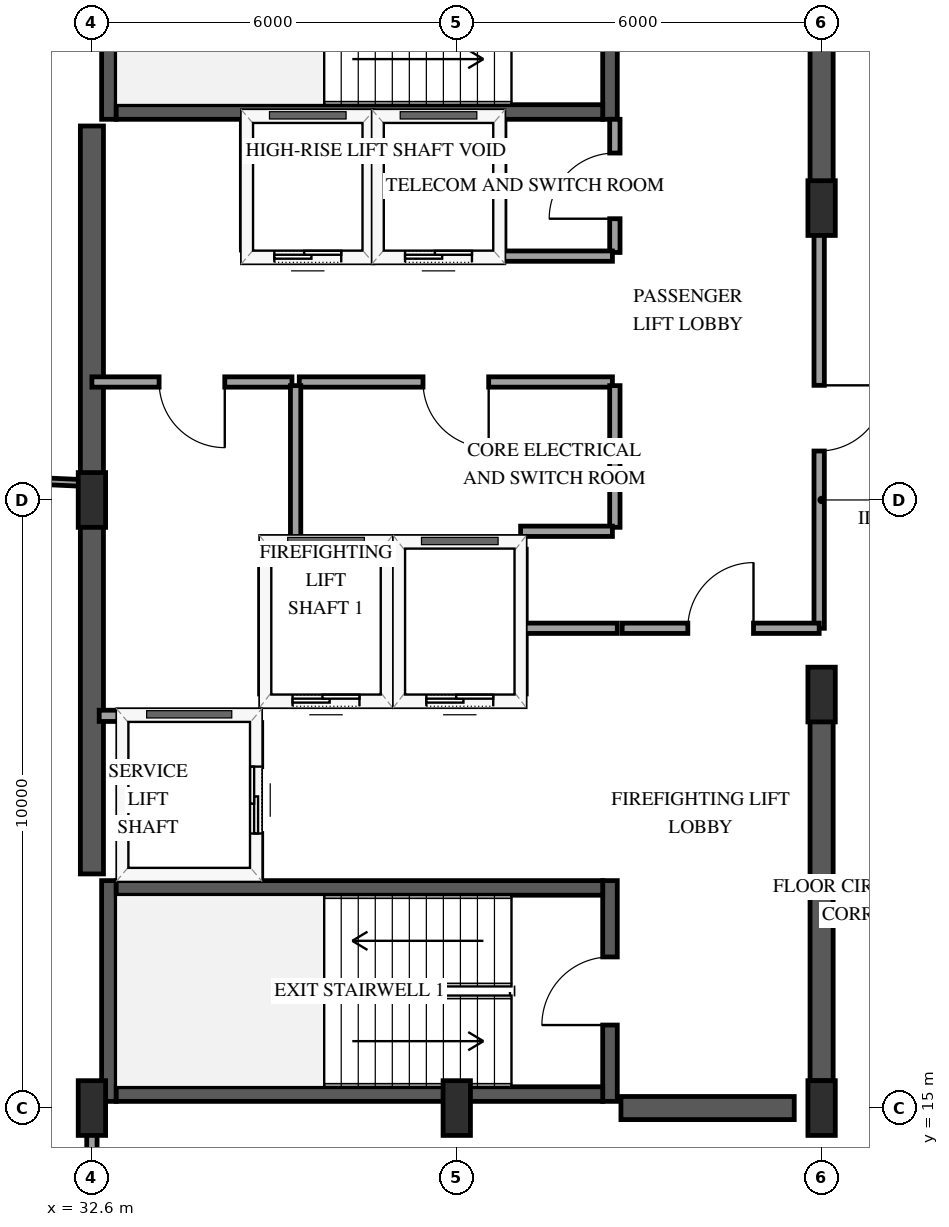
"""IFC4 building model, lengths in metres.
Left out: names, types, materials, properties, quantities, classifications, styles, units other than length and angle.
Written with IfcOpenShell. Run it as: python <this file> out.ifc"""

import sys

from ifc_helpers import new_model, si_unit, direction, frame, frame_2d, origin, origin_2d, place, context, subcontext, project, spatial, rectangle, extrude, element, fill, save


model = new_model("IFC4")
c1 = context("Model", 3, precision=1e-05, world=origin(), true_north=direction((0.0, 1.0)))
c2 = subcontext(c1, "Body", "Model", "MODEL_VIEW")
j1 = project(units=[si_unit("LENGTHUNIT", "METRE"), si_unit("PLANEANGLEUNIT", "RADIAN")], contexts=[c1])
p1 = place(None, origin())
s1 = spatial("IfcSite", under=j1, at=p1, CompositionType="ELEMENT")
p2 = place(p1, origin())
s2 = spatial("IfcBuilding", under=s1, at=p2, CompositionType="ELEMENT")
p3 = place(p2, frame((0.0, 0.0, 297.25)))
s3 = spatial("IfcBuildingStorey", under=s2, at=p3, CompositionType="ELEMENT", Elevation=297.25)
p4 = place(p3, frame((32.88, 15.11, 0.0), z_axis=(0.0, 0.0, 1.0), x_axis=(0.0, 1.0, 0.0)))
e1 = element("IfcWall", 1, at=p4, inside=s3, PredefinedType="SHEAR", context=c2, shape_type="SweptSolid", body=[
    extrude(rectangle(XDim=3.63, YDim=0.24, at=frame_2d((1.815, 0.0))), origin(), (0.0, 0.0, 1.0), 4.2),
])
p5 = place(p3, frame((41.12, 15.11, 0.0), z_axis=(0.0, 0.0, 1.0), x_axis=(0.0, 1.0, 0.0)))
e2 = element("IfcWall", 2, at=p5, inside=s3, PredefinedType="SHEAR", context=c2, shape_type="SweptSolid", body=[
    extrude(rectangle(XDim=3.63, YDim=0.24, at=frame_2d((1.815, 0.0))), origin(), (0.0, 0.0, 1.0), 4.2),
])
p6 = place(p5, frame((1.255, 0.0, 0.0)))
e3 = element("IfcOpeningElement", 3, at=p6, cuts=e2, PredefinedType="OPENING", context=c2, shape_type="SweptSolid", body=[
    extrude(rectangle(XDim=1.12, YDim=2.15, at=frame_2d((0.56, 1.075))), frame((0.0, 0.13, 0.0), z_axis=(0.0, -1.0, 0.0), x_axis=(1.0, 0.0, 0.0)), (0.0, 0.0, 1.0), 0.26),
])
for number, where, z_axis, x_axis in (
    (4, (33.0, 15.23, 0.0), (0.0, 0.0, 1.0), (1.0, 0.0, 0.0)),
    (5, (33.0, 18.62, 0.0), (0.0, 0.0, 1.0), (1.0, 0.0, 0.0)),
):
    element("IfcWall", number, at=place(p3, frame(where, z_axis=z_axis, x_axis=x_axis)), inside=s3, PredefinedType="SHEAR", context=c2, shape_type="SweptSolid", body=[
        extrude(rectangle(XDim=8.0, YDim=0.24, at=frame_2d((4.0, 0.0))), origin(), (0.0, 0.0, 1.0), 4.2),
    ])
p7 = place(p3, frame((32.88, 31.26, 0.0), z_axis=(0.0, 0.0, 1.0), x_axis=(0.0, 1.0, 0.0)))
e6 = element("IfcWall", 6, at=p7, inside=s3, PredefinedType="SHEAR", context=c2, shape_type="SweptSolid", body=[
    extrude(rectangle(XDim=3.63, YDim=0.24, at=frame_2d((1.815, 0.0))), origin(), (0.0, 0.0, 1.0), 4.2),
])
p8 = place(p3, frame((41.12, 31.26, 0.0), z_axis=(0.0, 0.0, 1.0), x_axis=(0.0, 1.0, 0.0)))
e7 = element("IfcWall", 7, at=p8, inside=s3, PredefinedType="SHEAR", context=c2, shape_type="SweptSolid", body=[
    extrude(rectangle(XDim=3.63, YDim=0.24, at=frame_2d((1.815, 0.0))), origin(), (0.0, 0.0, 1.0), 4.2),
])
p9 = place(p8, frame((1.255, 0.0, 0.0)))
e8 = element("IfcOpeningElement", 8, at=p9, cuts=e7, PredefinedType="OPENING", context=c2, shape_type="SweptSolid", body=[
    extrude(rectangle(XDim=1.12, YDim=2.15, at=frame_2d((0.56, 1.075))), frame((0.0, 0.13, 0.0), z_axis=(0.0, -1.0, 0.0), x_axis=(1.0, 0.0, 0.0)), (0.0, 0.0, 1.0), 0.26),
])
p10 = place(p3, frame((33.0, 31.38, 0.0), z_axis=(0.0, 0.0, 1.0), x_axis=(1.0, 0.0, 0.0)))
e9 = element("IfcWall", 9, at=p10, inside=s3, PredefinedType="SHEAR", context=c2, shape_type="SweptSolid", body=[
    extrude(rectangle(XDim=8.0, YDim=0.24, at=frame_2d((4.0, 0.0))), origin(), (0.0, 0.0, 1.0), 4.2),
])
p11 = place(p3, frame((32.6, 18.85, 0.0), z_axis=(0.0, 0.0, 1.0), x_axis=(0.0, 1.0, 0.0)))
e10 = element("IfcWall", 10, at=p11, inside=s3, PredefinedType="SHEAR", context=c2, shape_type="SweptSolid", body=[
    extrude(rectangle(XDim=12.3, YDim=0.38, at=frame_2d((6.15, 0.0))), origin(), (0.0, 0.0, 1.0), 4.2),
])
p12 = place(p3, frame((41.3, 15.0, 0.0), z_axis=(0.0, 0.0, 1.0), x_axis=(1.0, 0.0, 0.0)))
e11 = element("IfcWall", 11, at=p12, inside=s3, PredefinedType="SHEAR", context=c2, shape_type="SweptSolid", body=[
    extrude(rectangle(XDim=2.85, YDim=0.38, at=frame_2d((1.425, 0.0))), origin(), (0.0, 0.0, 1.0), 4.2),
])
p13 = place(p3, frame((44.6, 15.45, 0.0), z_axis=(0.0, 0.0, 1.0), x_axis=(0.0, 1.0, 0.0)))
e12 = element("IfcWall", 12, at=p13, inside=s3, PredefinedType="SHEAR", context=c2, shape_type="SweptSolid", body=[
    extrude(rectangle(XDim=6.35, YDim=0.38, at=frame_2d((3.175, 0.0))), origin(), (0.0, 0.0, 1.0), 4.2),
])
p14 = place(p3, frame((44.6, 29.8, 0.0), z_axis=(0.0, 0.0, 1.0), x_axis=(0.0, 1.0, 0.0)))
e13 = element("IfcWall", 13, at=p14, inside=s3, PredefinedType="SHEAR", context=c2, shape_type="SweptSolid", body=[
    extrude(rectangle(XDim=4.75, YDim=0.38, at=frame_2d((2.375, 0.0))), origin(), (0.0, 0.0, 1.0), 4.2),
])
for number, where, z_axis, x_axis in (
    (14, (32.6, 15.0, 0.0), (0.0, 0.0, 1.0), (1.0, 0.0, 0.0)),
    (15, (32.6, 25.0, 0.0), (0.0, 0.0, 1.0), (1.0, 0.0, 0.0)),
    (16, (38.6, 15.0, 0.0), (0.0, 0.0, 1.0), (1.0, 0.0, 0.0)),
    (17, (44.6, 15.0, 0.0), (0.0, 0.0, 1.0), (1.0, 0.0, 0.0)),
    (18, (44.6, 21.8, 0.0), (0.0, 0.0, 1.0), (1.0, 0.0, 0.0)),
    (19, (44.6, 29.8, 0.0), (0.0, 0.0, 1.0), (1.0, 0.0, 0.0)),
):
    element("IfcColumn", number, at=place(p3, frame(where, z_axis=z_axis, x_axis=x_axis)), inside=s3, PredefinedType="PILASTER", context=c2, shape_type="SweptSolid", body=[
        extrude(rectangle(XDim=0.45, YDim=0.9, at=origin_2d()), origin(), (0.0, 0.0, 1.0), 4.2),
    ])
p15 = place(p3, frame((35.45, 21.7, 0.0), z_axis=(0.0, 0.0, 1.0), x_axis=(1.0, 0.0, 0.0)))
e20 = element("IfcWall", 20, at=p15, inside=s3, PredefinedType="SOLIDWALL", context=c2, shape_type="SweptSolid", body=[
    extrude(rectangle(XDim=2.0, YDim=0.185, at=frame_2d((1.0, 0.0))), origin(), (0.0, 0.0, 1.0), 3.895),
])
p16 = place(p15, frame((0.45, 0.0, 0.0)))
e21 = element("IfcOpeningElement", 21, at=p16, cuts=e20, PredefinedType="OPENING", context=c2, shape_type="SweptSolid", body=[
    extrude(rectangle(XDim=1.1, YDim=2.15, at=frame_2d((0.55, 1.075))), frame((0.0, 0.103, 0.0), z_axis=(0.0, -1.0, 0.0), x_axis=(1.0, 0.0, 0.0)), (0.0, 0.0, 1.0), 0.205),
])
p17 = place(p3, frame((35.45, 24.3, 0.0), z_axis=(0.0, 0.0, 1.0), x_axis=(1.0, 0.0, 0.0)))
e22 = element("IfcWall", 22, at=p17, inside=s3, PredefinedType="SOLIDWALL", context=c2, shape_type="SweptSolid", body=[
    extrude(rectangle(XDim=2.0, YDim=0.185, at=frame_2d((1.0, 0.0))), origin(), (0.0, 0.0, 1.0), 3.895),
])
for number, where, z_axis, x_axis in (
    (23, (35.45, 21.81, 0.0), (0.0, 0.0, 1.0), (0.0, 1.0, 0.0)),
    (24, (37.45, 21.81, 0.0), (0.0, 0.0, 1.0), (0.0, 1.0, 0.0)),
):
    element("IfcWall", number, at=place(p3, frame(where, z_axis=z_axis, x_axis=x_axis)), inside=s3, PredefinedType="SOLIDWALL", context=c2, shape_type="SweptSolid", body=[
        extrude(rectangle(XDim=2.38, YDim=0.185, at=frame_2d((1.19, 0.0))), origin(), (0.0, 0.0, 1.0), 3.895),
    ])
p18 = place(p3, frame((37.65, 21.7, 0.0), z_axis=(0.0, 0.0, 1.0), x_axis=(1.0, 0.0, 0.0)))
e25 = element("IfcWall", 25, at=p18, inside=s3, PredefinedType="SOLIDWALL", context=c2, shape_type="SweptSolid", body=[
    extrude(rectangle(XDim=2.0, YDim=0.185, at=frame_2d((1.0, 0.0))), origin(), (0.0, 0.0, 1.0), 3.895),
])
p19 = place(p18, frame((0.45, 0.0, 0.0)))
e26 = element("IfcOpeningElement", 26, at=p19, cuts=e25, PredefinedType="OPENING", context=c2, shape_type="SweptSolid", body=[
    extrude(rectangle(XDim=1.1, YDim=2.15, at=frame_2d((0.55, 1.075))), frame((0.0, 0.103, 0.0), z_axis=(0.0, -1.0, 0.0), x_axis=(1.0, 0.0, 0.0)), (0.0, 0.0, 1.0), 0.205),
])
p20 = place(p3, frame((37.65, 24.3, 0.0), z_axis=(0.0, 0.0, 1.0), x_axis=(1.0, 0.0, 0.0)))
e27 = element("IfcWall", 27, at=p20, inside=s3, PredefinedType="SOLIDWALL", context=c2, shape_type="SweptSolid", body=[
    extrude(rectangle(XDim=2.0, YDim=0.185, at=frame_2d((1.0, 0.0))), origin(), (0.0, 0.0, 1.0), 3.895),
])
p21 = place(p3, frame((39.65, 21.81, 0.0), z_axis=(0.0, 0.0, 1.0), x_axis=(0.0, 1.0, 0.0)))
e28 = element("IfcWall", 28, at=p21, inside=s3, PredefinedType="SOLIDWALL", context=c2, shape_type="SweptSolid", body=[
    extrude(rectangle(XDim=2.38, YDim=0.185, at=frame_2d((1.19, 0.0))), origin(), (0.0, 0.0, 1.0), 3.895),
])
p22 = place(p3, frame((32.72, 21.45, 0.0), z_axis=(0.0, 0.0, 1.0), x_axis=(1.0, 0.0, 0.0)))
e29 = element("IfcWall", 29, at=p22, inside=s3, PredefinedType="SOLIDWALL", context=c2, shape_type="SweptSolid", body=[
    extrude(rectangle(XDim=2.58, YDim=0.185, at=frame_2d((1.29, 0.0))), origin(), (0.0, 0.0, 1.0), 3.895),
])
p23 = place(p3, frame((35.3, 18.79, 0.0), z_axis=(0.0, 0.0, 1.0), x_axis=(0.0, 1.0, 0.0)))
e30 = element("IfcWall", 30, at=p23, inside=s3, PredefinedType="SOLIDWALL", context=c2, shape_type="SweptSolid", body=[
    extrude(rectangle(XDim=2.55, YDim=0.185, at=frame_2d((1.275, 0.0))), origin(), (0.0, 0.0, 1.0), 3.895),
])
p24 = place(p23, frame((0.725, 0.0, 0.0)))
e31 = element("IfcOpeningElement", 31, at=p24, cuts=e30, PredefinedType="OPENING", context=c2, shape_type="SweptSolid", body=[
    extrude(rectangle(XDim=1.1, YDim=2.15, at=frame_2d((0.55, 1.075))), frame((0.0, 0.103, 0.0), z_axis=(0.0, -1.0, 0.0), x_axis=(1.0, 0.0, 0.0)), (0.0, 0.0, 1.0), 0.205),
])
p25 = place(p3, frame((35.15, 29.0, 0.0), z_axis=(0.0, 0.0, 1.0), x_axis=(1.0, 0.0, 0.0)))
e32 = element("IfcWall", 32, at=p25, inside=s3, PredefinedType="SOLIDWALL", context=c2, shape_type="SweptSolid", body=[
    extrude(rectangle(XDim=2.0, YDim=0.185, at=frame_2d((1.0, 0.0))), origin(), (0.0, 0.0, 1.0), 3.895),
])
p26 = place(p25, frame((0.45, 0.0, 0.0)))
e33 = element("IfcOpeningElement", 33, at=p26, cuts=e32, PredefinedType="OPENING", context=c2, shape_type="SweptSolid", body=[
    extrude(rectangle(XDim=1.1, YDim=2.15, at=frame_2d((0.55, 1.075))), frame((0.0, 0.103, 0.0), z_axis=(0.0, -1.0, 0.0), x_axis=(1.0, 0.0, 0.0)), (0.0, 0.0, 1.0), 0.205),
])
for number, where, z_axis, x_axis in (
    (34, (35.15, 29.11, 0.0), (0.0, 0.0, 1.0), (0.0, 1.0, 0.0)),
    (35, (37.15, 29.11, 0.0), (0.0, 0.0, 1.0), (0.0, 1.0, 0.0)),
):
    element("IfcWall", number, at=place(p3, frame(where, z_axis=z_axis, x_axis=x_axis)), inside=s3, PredefinedType="SOLIDWALL", context=c2, shape_type="SweptSolid", body=[
        extrude(rectangle(XDim=2.1, YDim=0.185, at=frame_2d((1.05, 0.0))), origin(), (0.0, 0.0, 1.0), 3.895),
    ])
p27 = place(p3, frame((37.3, 29.0, 0.0), z_axis=(0.0, 0.0, 1.0), x_axis=(1.0, 0.0, 0.0)))
e36 = element("IfcWall", 36, at=p27, inside=s3, PredefinedType="SOLIDWALL", context=c2, shape_type="SweptSolid", body=[
    extrude(rectangle(XDim=2.0, YDim=0.185, at=frame_2d((1.0, 0.0))), origin(), (0.0, 0.0, 1.0), 3.895),
])
p28 = place(p27, frame((0.45, 0.0, 0.0)))
e37 = element("IfcOpeningElement", 37, at=p28, cuts=e36, PredefinedType="OPENING", context=c2, shape_type="SweptSolid", body=[
    extrude(rectangle(XDim=1.1, YDim=2.15, at=frame_2d((0.55, 1.075))), frame((0.0, 0.103, 0.0), z_axis=(0.0, -1.0, 0.0), x_axis=(1.0, 0.0, 0.0)), (0.0, 0.0, 1.0), 0.205),
])
p29 = place(p3, frame((39.3, 29.11, 0.0), z_axis=(0.0, 0.0, 1.0), x_axis=(0.0, 1.0, 0.0)))
e38 = element("IfcWall", 38, at=p29, inside=s3, PredefinedType="SOLIDWALL", context=c2, shape_type="SweptSolid", body=[
    extrude(rectangle(XDim=2.1, YDim=0.185, at=frame_2d((1.05, 0.0))), origin(), (0.0, 0.0, 1.0), 3.895),
])
p30 = place(p3, frame((32.527, 25.276, 0.0), z_axis=(0.0, 0.0, 1.0), x_axis=(-0.998965188352, 0.045481341909, 0.0)))
e39 = element("IfcWall", 39, at=p30, inside=s3, PredefinedType="PARTITIONING", context=c2, shape_type="SweptSolid", body=[
    extrude(rectangle(XDim=7.215, YDim=0.11, at=frame_2d((3.607, 0.0))), origin(), (0.0, 0.0, 1.0), 3.19),
])
p31 = place(p3, frame((44.56, 29.8, 0.0), z_axis=(0.0, 0.0, 1.0), x_axis=(0.0, -1.0, 0.0)))
e40 = element("IfcWall", 40, at=p31, inside=s3, PredefinedType="PARTITIONING", context=c2, shape_type="SweptSolid", body=[
    extrude(rectangle(XDim=6.91, YDim=0.17, at=frame_2d((3.455, 0.0))), origin(), (0.0, 0.0, 1.0), 2.935),
])
p32 = place(p31, frame((2.915, 0.0, 0.0)))
e41 = element("IfcOpeningElement", 41, at=p32, cuts=e40, PredefinedType="OPENING", context=c2, shape_type="SweptSolid", body=[
    extrude(rectangle(XDim=1.08, YDim=2.15, at=frame_2d((0.54, 1.075))), frame((0.0, 0.095, 0.0), z_axis=(0.0, -1.0, 0.0), x_axis=(1.0, 0.0, 0.0)), (0.0, 0.0, 1.0), 0.19),
])
p33 = place(p3, frame((41.16, 26.94, 0.0), z_axis=(0.0, 0.0, 1.0), x_axis=(-1.0, 0.0, 0.0)))
e42 = element("IfcWall", 42, at=p33, inside=s3, PredefinedType="PARTITIONING", context=c2, shape_type="SweptSolid", body=[
    extrude(rectangle(XDim=5.15, YDim=0.17, at=frame_2d((2.575, 0.0))), origin(), (0.0, 0.0, 1.0), 3.895),
])
p34 = place(p33, frame((2.035, 0.0, 0.0)))
e43 = element("IfcOpeningElement", 43, at=p34, cuts=e42, PredefinedType="OPENING", context=c2, shape_type="SweptSolid", body=[
    extrude(rectangle(XDim=1.08, YDim=2.15, at=frame_2d((0.54, 1.075))), frame((0.0, 0.095, 0.0), z_axis=(0.0, -1.0, 0.0), x_axis=(1.0, 0.0, 0.0)), (0.0, 0.0, 1.0), 0.19),
])
p35 = place(p3, frame((35.89, 26.94, 0.0), z_axis=(0.0, 0.0, 1.0), x_axis=(-1.0, 0.0, 0.0)))
e44 = element("IfcWall", 44, at=p35, inside=s3, PredefinedType="PARTITIONING", context=c2, shape_type="SweptSolid", body=[
    extrude(rectangle(XDim=3.29, YDim=0.17, at=frame_2d((1.645, 0.0))), origin(), (0.0, 0.0, 1.0), 3.895),
])
p36 = place(p35, frame((1.105, 0.0, 0.0)))
e45 = element("IfcOpeningElement", 45, at=p36, cuts=e44, PredefinedType="OPENING", context=c2, shape_type="SweptSolid", body=[
    extrude(rectangle(XDim=1.08, YDim=2.15, at=frame_2d((0.54, 1.075))), frame((0.0, 0.095, 0.0), z_axis=(0.0, -1.0, 0.0), x_axis=(1.0, 0.0, 0.0)), (0.0, 0.0, 1.0), 0.19),
])
p37 = place(p3, frame((41.32, 22.89, 0.0), z_axis=(0.0, 0.0, 1.0), x_axis=(1.0, 0.0, 0.0)))
e46 = element("IfcWall", 46, at=p37, inside=s3, PredefinedType="PARTITIONING", context=c2, shape_type="SweptSolid", body=[
    extrude(rectangle(XDim=3.24, YDim=0.17, at=frame_2d((1.62, 0.0))), origin(), (0.0, 0.0, 1.0), 3.895),
])
p38 = place(p37, frame((1.08, 0.0, 0.0)))
e47 = element("IfcOpeningElement", 47, at=p38, cuts=e46, PredefinedType="OPENING", context=c2, shape_type="SweptSolid", body=[
    extrude(rectangle(XDim=1.08, YDim=2.15, at=frame_2d((0.54, 1.075))), frame((0.0, 0.095, 0.0), z_axis=(0.0, -1.0, 0.0), x_axis=(1.0, 0.0, 0.0)), (0.0, 0.0, 1.0), 0.19),
])
p39 = place(p3, frame((35.95, 26.88, 0.0), z_axis=(0.0, 0.0, 1.0), x_axis=(0.0, -1.0, 0.0)))
e48 = element("IfcWall", 48, at=p39, inside=s3, PredefinedType="PARTITIONING", context=c2, shape_type="SweptSolid", body=[
    extrude(rectangle(XDim=2.58, YDim=0.17, at=frame_2d((1.29, 0.0))), origin(), (0.0, 0.0, 1.0), 3.895),
])
p40 = place(p3, frame((41.2, 24.55, 0.0), z_axis=(0.0, 0.0, 1.0), x_axis=(0.0, 1.0, 0.0)))
e49 = element("IfcWall", 49, at=p40, inside=s3, PredefinedType="PARTITIONING", context=c2, shape_type="SweptSolid", body=[
    extrude(rectangle(XDim=2.33, YDim=0.17, at=frame_2d((1.165, 0.0))), origin(), (0.0, 0.0, 1.0), 3.895),
])
p41 = place(p3, frame((41.2, 29.07, 0.0), z_axis=(0.0, 0.0, 1.0), x_axis=(0.0, 1.0, 0.0)))
e50 = element("IfcWall", 50, at=p41, inside=s3, PredefinedType="PARTITIONING", context=c2, shape_type="SweptSolid", body=[
    extrude(rectangle(XDim=2.19, YDim=0.17, at=frame_2d((1.095, 0.0))), origin(), (0.0, 0.0, 1.0), 3.895),
])
p42 = place(p41, frame((0.555, 0.0, 0.0)))
e51 = element("IfcOpeningElement", 51, at=p42, cuts=e50, PredefinedType="OPENING", context=c2, shape_type="SweptSolid", body=[
    extrude(rectangle(XDim=1.08, YDim=2.15, at=frame_2d((0.54, 1.075))), frame((0.0, 0.095, 0.0), z_axis=(0.0, -1.0, 0.0), x_axis=(1.0, 0.0, 0.0)), (0.0, 0.0, 1.0), 0.19),
])
p43 = place(p3, frame((39.3, 29.01, 0.0), z_axis=(0.0, 0.0, 1.0), x_axis=(1.0, 0.0, 0.0)))
e52 = element("IfcWall", 52, at=p43, inside=s3, PredefinedType="PARTITIONING", context=c2, shape_type="SweptSolid", body=[
    extrude(rectangle(XDim=1.86, YDim=0.17, at=frame_2d((0.93, 0.0))), origin(), (0.0, 0.0, 1.0), 3.895),
])
p44 = place(p3, frame((39.72, 22.89, 0.0), z_axis=(0.0, 0.0, 1.0), x_axis=(1.0, 0.0, 0.0)))
e53 = element("IfcWall", 53, at=p44, inside=s3, PredefinedType="PARTITIONING", context=c2, shape_type="SweptSolid", body=[
    extrude(rectangle(XDim=1.52, YDim=0.17, at=frame_2d((0.76, 0.0))), origin(), (0.0, 0.0, 1.0), 3.895),
])
p45 = place(p3, frame((32.6, 13.37, 0.0), z_axis=(0.0, 0.0, 1.0), x_axis=(0.0, 1.0, 0.0)))
e54 = element("IfcWall", 54, at=p45, inside=s3, PredefinedType="PARTITIONING", context=c2, shape_type="SweptSolid", body=[
    extrude(rectangle(XDim=1.51, YDim=0.17, at=frame_2d((0.755, 0.0))), origin(), (0.0, 0.0, 1.0), 3.895),
])
p46 = place(p3, frame((39.65, 24.485, 0.0), z_axis=(0.0, 0.0, 1.0), x_axis=(1.0, 0.0, 0.0)))
e55 = element("IfcWall", 55, at=p46, inside=s3, PredefinedType="PARTITIONING", context=c2, shape_type="SweptSolid", body=[
    extrude(rectangle(XDim=1.51, YDim=0.17, at=frame_2d((0.755, 0.0))), origin(), (0.0, 0.0, 1.0), 3.895),
])
p47 = place(p16, origin())
e56 = element("IfcDoor", 56, at=p47, inside=s3, OperationType="SLIDING_TO_LEFT", PredefinedType="DOOR", context=c2, shape_type="SweptSolid", body=[
    extrude(rectangle(XDim=1.1, YDim=2.15, at=frame_2d((0.55, 1.075))), frame((0.0, 0.025, 0.0), z_axis=(0.0, -1.0, 0.0), x_axis=(1.0, 0.0, 0.0)), (0.0, 0.0, 1.0), 0.05),
])
fill(e21, e56)
p48 = place(p19, origin())
e57 = element("IfcDoor", 57, at=p48, inside=s3, OperationType="SLIDING_TO_LEFT", PredefinedType="DOOR", context=c2, shape_type="SweptSolid", body=[
    extrude(rectangle(XDim=1.1, YDim=2.15, at=frame_2d((0.55, 1.075))), frame((0.0, 0.025, 0.0), z_axis=(0.0, -1.0, 0.0), x_axis=(1.0, 0.0, 0.0)), (0.0, 0.0, 1.0), 0.05),
])
fill(e26, e57)
p49 = place(p24, origin())
e58 = element("IfcDoor", 58, at=p49, inside=s3, OperationType="SLIDING_TO_LEFT", PredefinedType="DOOR", context=c2, shape_type="SweptSolid", body=[
    extrude(rectangle(XDim=1.1, YDim=2.15, at=frame_2d((0.55, 1.075))), frame((0.0, 0.025, 0.0), z_axis=(0.0, -1.0, 0.0), x_axis=(1.0, 0.0, 0.0)), (0.0, 0.0, 1.0), 0.05),
])
fill(e31, e58)
p50 = place(p26, origin())
e59 = element("IfcDoor", 59, at=p50, inside=s3, OperationType="SLIDING_TO_LEFT", PredefinedType="DOOR", context=c2, shape_type="SweptSolid", body=[
    extrude(rectangle(XDim=1.1, YDim=2.15, at=frame_2d((0.55, 1.075))), frame((0.0, 0.025, 0.0), z_axis=(0.0, -1.0, 0.0), x_axis=(1.0, 0.0, 0.0)), (0.0, 0.0, 1.0), 0.05),
])
fill(e33, e59)
p51 = place(p28, origin())
e60 = element("IfcDoor", 60, at=p51, inside=s3, OperationType="SLIDING_TO_LEFT", PredefinedType="DOOR", context=c2, shape_type="SweptSolid", body=[
    extrude(rectangle(XDim=1.1, YDim=2.15, at=frame_2d((0.55, 1.075))), frame((0.0, 0.025, 0.0), z_axis=(0.0, -1.0, 0.0), x_axis=(1.0, 0.0, 0.0)), (0.0, 0.0, 1.0), 0.05),
])
fill(e37, e60)
p52 = place(p6, origin())
e61 = element("IfcDoor", 61, at=p52, inside=s3, OperationType="SINGLE_SWING_LEFT", PredefinedType="DOOR", context=c2, shape_type="SweptSolid", body=[
    extrude(rectangle(XDim=1.12, YDim=2.15, at=frame_2d((0.56, 1.075))), frame((0.0, 0.025, 0.0), z_axis=(0.0, -1.0, 0.0), x_axis=(1.0, 0.0, 0.0)), (0.0, 0.0, 1.0), 0.05),
])
fill(e3, e61)
p53 = place(p32, origin())
e62 = element("IfcDoor", 62, at=p53, inside=s3, OperationType="SINGLE_SWING_LEFT", PredefinedType="DOOR", context=c2, shape_type="SweptSolid", body=[
    extrude(rectangle(XDim=1.08, YDim=2.15, at=frame_2d((0.54, 1.075))), frame((0.0, 0.025, 0.0), z_axis=(0.0, -1.0, 0.0), x_axis=(1.0, 0.0, 0.0)), (0.0, 0.0, 1.0), 0.05),
])
fill(e41, e62)
p54 = place(p34, origin())
e63 = element("IfcDoor", 63, at=p54, inside=s3, OperationType="SINGLE_SWING_LEFT", PredefinedType="DOOR", context=c2, shape_type="SweptSolid", body=[
    extrude(rectangle(XDim=1.08, YDim=2.15, at=frame_2d((0.54, 1.075))), frame((0.0, 0.025, 0.0), z_axis=(0.0, -1.0, 0.0), x_axis=(1.0, 0.0, 0.0)), (0.0, 0.0, 1.0), 0.05),
])
fill(e43, e63)
p55 = place(p36, origin())
e64 = element("IfcDoor", 64, at=p55, inside=s3, OperationType="SINGLE_SWING_LEFT", PredefinedType="DOOR", context=c2, shape_type="SweptSolid", body=[
    extrude(rectangle(XDim=1.08, YDim=2.15, at=frame_2d((0.54, 1.075))), frame((0.0, 0.025, 0.0), z_axis=(0.0, -1.0, 0.0), x_axis=(1.0, 0.0, 0.0)), (0.0, 0.0, 1.0), 0.05),
])
fill(e45, e64)
p56 = place(p38, origin())
e65 = element("IfcDoor", 65, at=p56, inside=s3, OperationType="SINGLE_SWING_RIGHT", PredefinedType="DOOR", context=c2, shape_type="SweptSolid", body=[
    extrude(rectangle(XDim=1.08, YDim=2.15, at=frame_2d((0.54, 1.075))), frame((0.0, 0.025, 0.0), z_axis=(0.0, -1.0, 0.0), x_axis=(1.0, 0.0, 0.0)), (0.0, 0.0, 1.0), 0.05),
])
fill(e47, e65)
p57 = place(p42, origin())
e66 = element("IfcDoor", 66, at=p57, inside=s3, OperationType="SINGLE_SWING_LEFT", PredefinedType="DOOR", context=c2, shape_type="SweptSolid", body=[
    extrude(rectangle(XDim=1.08, YDim=2.15, at=frame_2d((0.54, 1.075))), frame((0.0, 0.025, 0.0), z_axis=(0.0, -1.0, 0.0), x_axis=(1.0, 0.0, 0.0)), (0.0, 0.0, 1.0), 0.05),
])
fill(e51, e66)
save(model, sys.argv[1])
